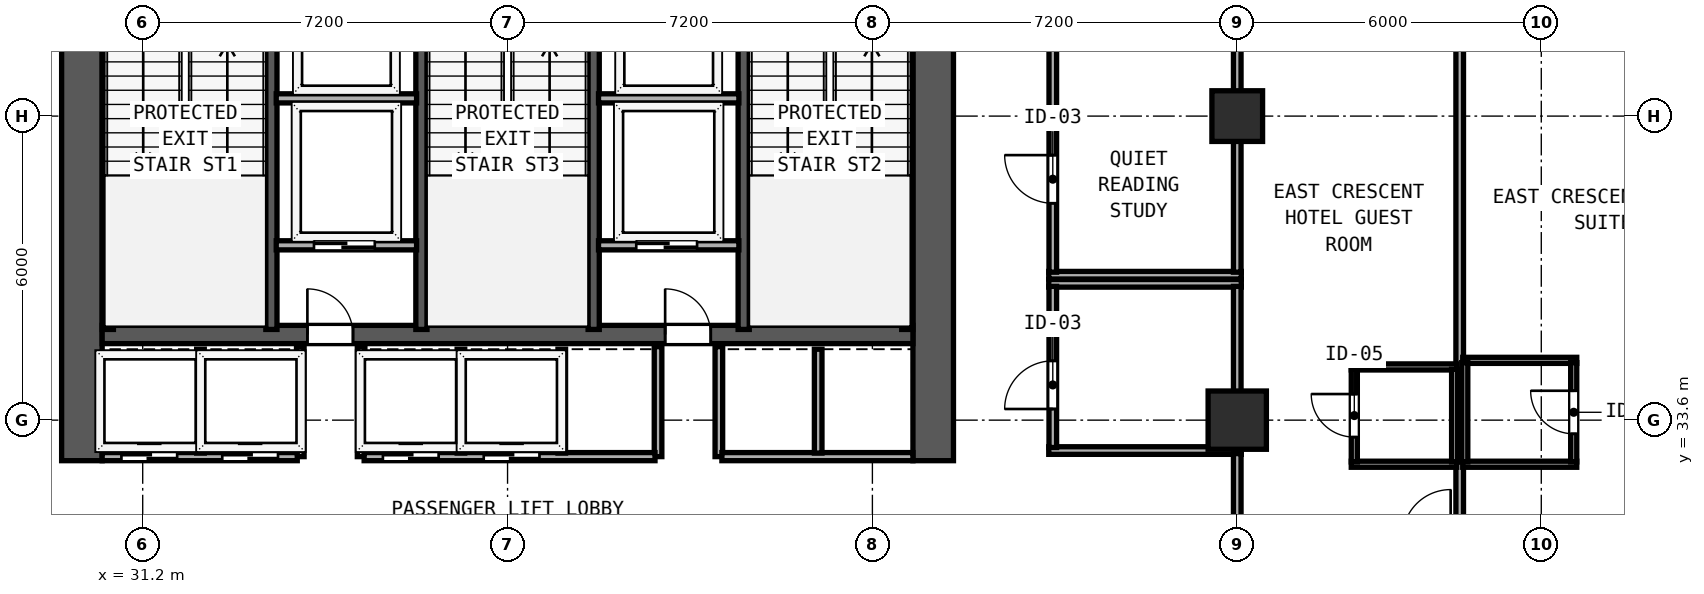
"""IFC4 building model, lengths in metres.
Left out: names, types, materials, properties, quantities, classifications, styles, units other than length and angle.
Written with IfcOpenShell. Run it as: python <this file> out.ifc"""

import sys

from ifc_helpers import new_model, si_unit, direction, frame, frame_2d, origin, origin_2d, place, context, subcontext, project, spatial, rectangle, hollow_rectangle, extrude, element, fill, save


model = new_model("IFC4")
c1 = context("Model", 3, precision=1e-05, world=origin(), true_north=direction((0.0, 1.0)))
c2 = subcontext(c1, "Body", "Model", "MODEL_VIEW")
j1 = project(units=[si_unit("LENGTHUNIT", "METRE"), si_unit("PLANEANGLEUNIT", "RADIAN")], contexts=[c1])
p1 = place(None, origin())
s1 = spatial("IfcSite", under=j1, at=p1, CompositionType="ELEMENT")
p2 = place(p1, origin())
s2 = spatial("IfcBuilding", under=s1, at=p2, CompositionType="ELEMENT")
p3 = place(p2, frame((0.0, 0.0, 55.2)))
s3 = spatial("IfcBuildingStorey", under=s2, at=p3, CompositionType="ELEMENT", Elevation=55.2)
for number, where, z_axis, x_axis in (
    (1, (30.0, 32.8, 0.0), (0.0, 0.0, 1.0), (0.0, 1.0, 0.0)),
    (2, (46.8, 32.8, 0.0), (0.0, 0.0, 1.0), (0.0, 1.0, 0.0)),
):
    element("IfcWall", number, at=place(p3, frame(where, z_axis=z_axis, x_axis=x_axis)), inside=s3, PredefinedType="SHEAR", context=c2, shape_type="SweptSolid", body=[
        extrude(rectangle(XDim=10.0, YDim=0.8, at=frame_2d((5.0, 0.0))), origin(), (0.0, 0.0, 1.0), 3.6),
    ])
p4 = place(p3, frame((30.4, 35.29, 0.0), z_axis=(0.0, 0.0, 1.0), x_axis=(1.0, 0.0, 0.0)))
e3 = element("IfcWall", 3, at=p4, inside=s3, PredefinedType="SHEAR", context=c2, shape_type="SweptSolid", body=[
    extrude(rectangle(XDim=16.0, YDim=0.36, at=frame_2d((8.0, 0.0))), origin(), (0.0, 0.0, 1.0), 3.6),
])
p5 = place(p4, frame((4.95, 0.0, 0.0), z_axis=(0.0, 0.0, 1.0), x_axis=(-1.0, 0.0, 0.0)))
e4 = element("IfcOpeningElement", 4, at=p5, cuts=e3, PredefinedType="OPENING", context=c2, shape_type="SweptSolid", body=[
    extrude(rectangle(XDim=0.9, YDim=2.1, at=frame_2d((0.45, 1.05))), frame((0.0, 0.19, 0.0), z_axis=(0.0, -1.0, 0.0), x_axis=(1.0, 0.0, 0.0)), (0.0, 0.0, 1.0), 0.38),
])
p6 = place(p4, frame((12.01, 0.0, 0.0), z_axis=(0.0, 0.0, 1.0), x_axis=(-1.0, 0.0, 0.0)))
e5 = element("IfcOpeningElement", 5, at=p6, cuts=e3, PredefinedType="OPENING", context=c2, shape_type="SweptSolid", body=[
    extrude(rectangle(XDim=0.9, YDim=2.1, at=frame_2d((0.45, 1.05))), frame((0.0, 0.19, 0.0), z_axis=(0.0, -1.0, 0.0), x_axis=(1.0, 0.0, 0.0)), (0.0, 0.0, 1.0), 0.38),
])
for number, where, z_axis, x_axis in (
    (6, (30.512, 35.39, 0.0), (0.0, 0.0, 1.0), (0.0, 1.0, 0.0)),
    (7, (33.74, 35.39, 0.0), (0.0, 0.0, 1.0), (0.0, 1.0, 0.0)),
    (8, (36.7, 35.39, 0.0), (0.0, 0.0, 1.0), (0.0, 1.0, 0.0)),
    (9, (40.1, 35.39, 0.0), (0.0, 0.0, 1.0), (0.0, 1.0, 0.0)),
    (10, (43.06, 35.39, 0.0), (0.0, 0.0, 1.0), (0.0, 1.0, 0.0)),
    (11, (46.288, 35.39, 0.0), (0.0, 0.0, 1.0), (0.0, 1.0, 0.0)),
):
    element("IfcWall", number, at=place(p3, frame(where, z_axis=z_axis, x_axis=x_axis)), inside=s3, PredefinedType="SHEAR", context=c2, shape_type="SweptSolid", body=[
        extrude(rectangle(XDim=7.41, YDim=0.22, at=frame_2d((3.705, 0.0))), origin(), (0.0, 0.0, 1.0), 3.6),
    ])
p7 = place(p3, frame((52.8, 33.6, 0.0), z_axis=(0.0, 0.0, 1.0), x_axis=(1.0, 0.0, 0.0)))
e12 = element("IfcColumn", 12, at=p7, inside=s3, PredefinedType="COLUMN", context=c2, shape_type="SweptSolid", body=[
    extrude(hollow_rectangle(XDim=1.15, YDim=1.15, WallThickness=0.042, at=origin_2d()), origin(), (0.0, 0.0, 1.0), 3.8),
])
p8 = place(p3, frame((52.8, 39.6, 0.0), z_axis=(0.0, 0.0, 1.0), x_axis=(1.0, 0.0, 0.0)))
e13 = element("IfcColumn", 13, at=p8, inside=s3, PredefinedType="COLUMN", context=c2, shape_type="SweptSolid", body=[
    extrude(hollow_rectangle(XDim=1.0, YDim=1.0, WallThickness=0.038, at=origin_2d()), origin(), (0.0, 0.0, 1.0), 3.8),
])
p9 = place(p3, frame((62.722, 39.509, 0.0), z_axis=(0.0, 0.0, 1.0), x_axis=(-0.759247334792, 0.650802185469, 0.0)))
e14 = element("IfcWall", 14, at=p9, inside=s3, PredefinedType="SOLIDWALL", context=c2, shape_type="SweptSolid", body=[
    extrude(rectangle(XDim=3.719, YDim=0.24, at=frame_2d((1.86, 0.0))), origin(), (0.0, 0.0, 1.0), 3.6),
])
p10 = place(p9, frame((1.6, 0.0, 0.85)))
e15 = element("IfcOpeningElement", 15, at=p10, cuts=e14, PredefinedType="OPENING", context=c2, shape_type="SweptSolid", body=[
    extrude(rectangle(XDim=1.2, YDim=1.85, at=frame_2d((0.6, 0.925))), frame((0.0, 0.13, 0.0), z_axis=(0.0, -1.0, 0.0), x_axis=(1.0, 0.0, 0.0)), (0.0, 0.0, 1.0), 0.26),
])
for number, where, z_axis, x_axis in (
    (16, (33.835, 39.95, 0.0), (0.0, 0.0, 1.0), (1.0, 0.0, 0.0)),
    (17, (40.195, 39.95, 0.0), (0.0, 0.0, 1.0), (1.0, 0.0, 0.0)),
):
    element("IfcWall", number, at=place(p3, frame(where, z_axis=z_axis, x_axis=x_axis)), inside=s3, PredefinedType="SOLIDWALL", context=c2, shape_type="SweptSolid", body=[
        extrude(rectangle(XDim=2.77, YDim=0.18, at=frame_2d((1.385, 0.0))), origin(), (0.0, 0.0, 1.0), 3.6),
    ])
p11 = place(p3, frame((33.835, 37.05, 0.0), z_axis=(0.0, 0.0, 1.0), x_axis=(1.0, 0.0, 0.0)))
e18 = element("IfcWall", 18, at=p11, inside=s3, PredefinedType="SOLIDWALL", context=c2, shape_type="SweptSolid", body=[
    extrude(rectangle(XDim=2.77, YDim=0.18, at=frame_2d((1.385, 0.0))), origin(), (0.0, 0.0, 1.0), 3.6),
])
p12 = place(p11, frame((1.945, 0.0, 0.0), z_axis=(0.0, 0.0, 1.0), x_axis=(-1.0, 0.0, 0.0)))
e19 = element("IfcOpeningElement", 19, at=p12, cuts=e18, PredefinedType="OPENING", context=c2, shape_type="SweptSolid", body=[
    extrude(rectangle(XDim=1.2, YDim=2.2, at=frame_2d((0.6, 1.1))), frame((0.0, 0.1, 0.0), z_axis=(0.0, -1.0, 0.0), x_axis=(1.0, 0.0, 0.0)), (0.0, 0.0, 1.0), 0.2),
])
for number, where, z_axis, x_axis in (
    (20, (34.31, 32.88, 0.0), (0.0, 0.0, 1.0), (0.0, 1.0, 0.0)),
    (21, (35.51, 32.88, 0.0), (0.0, 0.0, 1.0), (0.0, 1.0, 0.0)),
):
    element("IfcWall", number, at=place(p3, frame(where, z_axis=z_axis, x_axis=x_axis)), inside=s3, PredefinedType="SOLIDWALL", context=c2, shape_type="SweptSolid", body=[
        extrude(rectangle(XDim=2.17, YDim=0.15, at=frame_2d((1.085, 0.0))), origin(), (0.0, 0.0, 1.0), 3.6),
    ])
p13 = place(p3, frame((40.195, 37.05, 0.0), z_axis=(0.0, 0.0, 1.0), x_axis=(1.0, 0.0, 0.0)))
e22 = element("IfcWall", 22, at=p13, inside=s3, PredefinedType="SOLIDWALL", context=c2, shape_type="SweptSolid", body=[
    extrude(rectangle(XDim=2.77, YDim=0.18, at=frame_2d((1.385, 0.0))), origin(), (0.0, 0.0, 1.0), 3.6),
])
p14 = place(p13, frame((1.945, 0.0, 0.0), z_axis=(0.0, 0.0, 1.0), x_axis=(-1.0, 0.0, 0.0)))
e23 = element("IfcOpeningElement", 23, at=p14, cuts=e22, PredefinedType="OPENING", context=c2, shape_type="SweptSolid", body=[
    extrude(rectangle(XDim=1.2, YDim=2.2, at=frame_2d((0.6, 1.1))), frame((0.0, 0.1, 0.0), z_axis=(0.0, -1.0, 0.0), x_axis=(1.0, 0.0, 0.0)), (0.0, 0.0, 1.0), 0.2),
])
for number, where, z_axis, x_axis in (
    (24, (41.37, 32.88, 0.0), (0.0, 0.0, 1.0), (0.0, 1.0, 0.0)),
    (25, (42.57, 32.88, 0.0), (0.0, 0.0, 1.0), (0.0, 1.0, 0.0)),
):
    element("IfcWall", number, at=place(p3, frame(where, z_axis=z_axis, x_axis=x_axis)), inside=s3, PredefinedType="SOLIDWALL", context=c2, shape_type="SweptSolid", body=[
        extrude(rectangle(XDim=2.17, YDim=0.15, at=frame_2d((1.085, 0.0))), origin(), (0.0, 0.0, 1.0), 3.6),
    ])
p15 = place(p3, frame((30.4, 32.88, 0.0), z_axis=(0.0, 0.0, 1.0), x_axis=(1.0, 0.0, 0.0)))
e26 = element("IfcWall", 26, at=p15, inside=s3, PredefinedType="SOLIDWALL", context=c2, shape_type="SweptSolid", body=[
    extrude(rectangle(XDim=3.85, YDim=0.16, at=frame_2d((1.925, 0.0))), origin(), (0.0, 0.0, 1.0), 3.6),
])
p16 = place(p15, frame((1.48, 0.0, 0.0), z_axis=(0.0, 0.0, 1.0), x_axis=(-1.0, 0.0, 0.0)))
e27 = element("IfcOpeningElement", 27, at=p16, cuts=e26, PredefinedType="OPENING", context=c2, shape_type="SweptSolid", body=[
    extrude(rectangle(XDim=1.1, YDim=2.2, at=frame_2d((0.55, 1.1))), frame((0.0, 0.09, 0.0), z_axis=(0.0, -1.0, 0.0), x_axis=(1.0, 0.0, 0.0)), (0.0, 0.0, 1.0), 0.18),
])
p17 = place(p15, frame((3.47, 0.0, 0.0), z_axis=(0.0, 0.0, 1.0), x_axis=(-1.0, 0.0, 0.0)))
e28 = element("IfcOpeningElement", 28, at=p17, cuts=e26, PredefinedType="OPENING", context=c2, shape_type="SweptSolid", body=[
    extrude(rectangle(XDim=1.1, YDim=2.2, at=frame_2d((0.55, 1.1))), frame((0.0, 0.09, 0.0), z_axis=(0.0, -1.0, 0.0), x_axis=(1.0, 0.0, 0.0)), (0.0, 0.0, 1.0), 0.18),
])
p18 = place(p3, frame((35.57, 32.88, 0.0), z_axis=(0.0, 0.0, 1.0), x_axis=(1.0, 0.0, 0.0)))
e29 = element("IfcWall", 29, at=p18, inside=s3, PredefinedType="SOLIDWALL", context=c2, shape_type="SweptSolid", body=[
    extrude(rectangle(XDim=5.74, YDim=0.16, at=frame_2d((2.87, 0.0))), origin(), (0.0, 0.0, 1.0), 3.6),
])
p19 = place(p18, frame((1.47, 0.0, 0.0), z_axis=(0.0, 0.0, 1.0), x_axis=(-1.0, 0.0, 0.0)))
e30 = element("IfcOpeningElement", 30, at=p19, cuts=e29, PredefinedType="OPENING", context=c2, shape_type="SweptSolid", body=[
    extrude(rectangle(XDim=1.1, YDim=2.2, at=frame_2d((0.55, 1.1))), frame((0.0, 0.09, 0.0), z_axis=(0.0, -1.0, 0.0), x_axis=(1.0, 0.0, 0.0)), (0.0, 0.0, 1.0), 0.18),
])
p20 = place(p18, frame((3.46, 0.0, 0.0), z_axis=(0.0, 0.0, 1.0), x_axis=(-1.0, 0.0, 0.0)))
e31 = element("IfcOpeningElement", 31, at=p20, cuts=e29, PredefinedType="OPENING", context=c2, shape_type="SweptSolid", body=[
    extrude(rectangle(XDim=1.1, YDim=2.2, at=frame_2d((0.55, 1.1))), frame((0.0, 0.09, 0.0), z_axis=(0.0, -1.0, 0.0), x_axis=(1.0, 0.0, 0.0)), (0.0, 0.0, 1.0), 0.18),
])
p21 = place(p3, frame((42.63, 32.88, 0.0), z_axis=(0.0, 0.0, 1.0), x_axis=(1.0, 0.0, 0.0)))
e32 = element("IfcWall", 32, at=p21, inside=s3, PredefinedType="SOLIDWALL", context=c2, shape_type="SweptSolid", body=[
    extrude(rectangle(XDim=3.77, YDim=0.16, at=frame_2d((1.885, 0.0))), origin(), (0.0, 0.0, 1.0), 3.6),
])
for number, where, z_axis, x_axis in (
    (33, (32.34, 32.95, 0.0), (0.0, 0.0, 1.0), (0.0, 1.0, 0.0)),
    (34, (37.48, 32.95, 0.0), (0.0, 0.0, 1.0), (0.0, 1.0, 0.0)),
    (35, (39.47, 32.95, 0.0), (0.0, 0.0, 1.0), (0.0, 1.0, 0.0)),
    (36, (44.53, 32.95, 0.0), (0.0, 0.0, 1.0), (0.0, 1.0, 0.0)),
):
    element("IfcWall", number, at=place(p3, frame(where, z_axis=z_axis, x_axis=x_axis)), inside=s3, PredefinedType="SOLIDWALL", context=c2, shape_type="SweptSolid", body=[
        extrude(rectangle(XDim=2.05, YDim=0.15, at=frame_2d((1.025, 0.0))), origin(), (0.0, 0.0, 1.0), 3.6),
    ])
for number, where, z_axis, x_axis in (
    (37, (49.08, 36.3, 0.0), (0.0, 0.0, 1.0), (1.0, 0.0, 0.0)),
    (38, (49.08, 33.0, 0.0), (0.0, 0.0, 1.0), (1.0, 0.0, 0.0)),
):
    element("IfcWall", number, at=place(p3, frame(where, z_axis=z_axis, x_axis=x_axis)), inside=s3, PredefinedType="PARTITIONING", context=c2, shape_type="SweptSolid", body=[
        extrude(rectangle(XDim=3.8, YDim=0.15, at=frame_2d((1.9, 0.0))), origin(), (0.0, 0.0, 1.0), 3.6),
    ])
p22 = place(p3, frame((49.16, 33.06, 0.0), z_axis=(0.0, 0.0, 1.0), x_axis=(0.0, 1.0, 0.0)))
e39 = element("IfcWall", 39, at=p22, inside=s3, PredefinedType="PARTITIONING", context=c2, shape_type="SweptSolid", body=[
    extrude(rectangle(XDim=3.18, YDim=0.15, at=frame_2d((1.59, 0.0))), origin(), (0.0, 0.0, 1.0), 3.6),
])
p23 = place(p22, frame((0.76, 0.0, 0.0)))
e40 = element("IfcOpeningElement", 40, at=p23, cuts=e39, PredefinedType="OPENING", context=c2, shape_type="SweptSolid", body=[
    extrude(rectangle(XDim=0.95, YDim=2.12, at=frame_2d((0.475, 1.06))), frame((0.0, 0.085, 0.0), z_axis=(0.0, -1.0, 0.0), x_axis=(1.0, 0.0, 0.0)), (0.0, 0.0, 1.0), 0.17),
])
p24 = place(p3, frame((52.8, 33.06, 0.0), z_axis=(0.0, 0.0, 1.0), x_axis=(0.0, 1.0, 0.0)))
e41 = element("IfcWall", 41, at=p24, inside=s3, PredefinedType="PARTITIONING", context=c2, shape_type="SweptSolid", body=[
    extrude(rectangle(XDim=3.18, YDim=0.15, at=frame_2d((1.59, 0.0))), origin(), (0.0, 0.0, 1.0), 3.097),
])
p25 = place(p3, frame((49.08, 36.46, 0.0), z_axis=(0.0, 0.0, 1.0), x_axis=(1.0, 0.0, 0.0)))
e42 = element("IfcWall", 42, at=p25, inside=s3, PredefinedType="PARTITIONING", context=c2, shape_type="SweptSolid", body=[
    extrude(rectangle(XDim=3.8, YDim=0.15, at=frame_2d((1.9, 0.0))), origin(), (0.0, 0.0, 1.0), 3.6),
])
p26 = place(p3, frame((49.16, 36.52, 0.0), z_axis=(0.0, 0.0, 1.0), x_axis=(0.0, 1.0, 0.0)))
e43 = element("IfcWall", 43, at=p26, inside=s3, PredefinedType="PARTITIONING", context=c2, shape_type="SweptSolid", body=[
    extrude(rectangle(XDim=4.62, YDim=0.15, at=frame_2d((2.31, 0.0))), origin(), (0.0, 0.0, 1.0), 3.6),
])
p27 = place(p26, frame((1.36, 0.0, 0.0)))
e44 = element("IfcOpeningElement", 44, at=p27, cuts=e43, PredefinedType="OPENING", context=c2, shape_type="SweptSolid", body=[
    extrude(rectangle(XDim=0.95, YDim=2.12, at=frame_2d((0.475, 1.06))), frame((0.0, 0.085, 0.0), z_axis=(0.0, -1.0, 0.0), x_axis=(1.0, 0.0, 0.0)), (0.0, 0.0, 1.0), 0.17),
])
p28 = place(p3, frame((52.8, 36.52, 0.0), z_axis=(0.0, 0.0, 1.0), x_axis=(0.0, 1.0, 0.0)))
e45 = element("IfcWall", 45, at=p28, inside=s3, PredefinedType="PARTITIONING", context=c2, shape_type="SweptSolid", body=[
    extrude(rectangle(XDim=4.62, YDim=0.15, at=frame_2d((2.31, 0.0))), origin(), (0.0, 0.0, 1.0), 3.097),
])
p29 = place(p3, frame((52.8, 31.34, 0.0), z_axis=(0.0, 0.0, 1.0), x_axis=(0.0, 1.0, 0.0)))
e46 = element("IfcWall", 46, at=p29, inside=s3, PredefinedType="PARTITIONING", context=c2, shape_type="SweptSolid", body=[
    extrude(rectangle(XDim=1.6, YDim=0.15, at=frame_2d((0.8, 0.0))), origin(), (0.0, 0.0, 1.0), 3.097),
])
p30 = place(p3, frame((57.19, 31.34, 0.0), z_axis=(0.0, 0.0, 1.0), x_axis=(0.0, 1.0, 0.0)))
e47 = element("IfcWall", 47, at=p30, inside=s3, PredefinedType="PARTITIONING", context=c2, shape_type="SweptSolid", body=[
    extrude(rectangle(XDim=11.359, YDim=0.15, at=frame_2d((5.68, 0.0))), origin(), (0.0, 0.0, 1.0), 3.6),
])
for number, where, z_axis, x_axis in (
    (48, (55.05, 34.65, 0.0), (0.0, 0.0, 1.0), (1.0, 0.0, 0.0)),
    (49, (55.05, 32.73, 0.0), (0.0, 0.0, 1.0), (1.0, 0.0, 0.0)),
):
    element("IfcWall", number, at=place(p3, frame(where, z_axis=z_axis, x_axis=x_axis)), inside=s3, PredefinedType="PARTITIONING", context=c2, shape_type="SweptSolid", body=[
        extrude(rectangle(XDim=2.08, YDim=0.12, at=frame_2d((1.04, 0.0))), origin(), (0.0, 0.0, 1.0), 3.6),
    ])
p31 = place(p3, frame((55.11, 32.775, 0.0), z_axis=(0.0, 0.0, 1.0), x_axis=(0.0, 1.0, 0.0)))
e50 = element("IfcWall", 50, at=p31, inside=s3, PredefinedType="PARTITIONING", context=c2, shape_type="SweptSolid", body=[
    extrude(rectangle(XDim=1.83, YDim=0.12, at=frame_2d((0.915, 0.0))), origin(), (0.0, 0.0, 1.0), 3.6),
])
p32 = place(p31, frame((1.34, 0.0, 0.0), z_axis=(0.0, 0.0, 1.0), x_axis=(-1.0, 0.0, 0.0)))
e51 = element("IfcOpeningElement", 51, at=p32, cuts=e50, PredefinedType="OPENING", context=c2, shape_type="SweptSolid", body=[
    extrude(rectangle(XDim=0.85, YDim=2.1, at=frame_2d((0.425, 1.05))), frame((0.0, 0.07, 0.0), z_axis=(0.0, -1.0, 0.0), x_axis=(1.0, 0.0, 0.0)), (0.0, 0.0, 1.0), 0.14),
])
p33 = place(p3, frame((57.09, 32.775, 0.0), z_axis=(0.0, 0.0, 1.0), x_axis=(0.0, 1.0, 0.0)))
e52 = element("IfcWall", 52, at=p33, inside=s3, PredefinedType="PARTITIONING", context=c2, shape_type="SweptSolid", body=[
    extrude(rectangle(XDim=1.83, YDim=0.12, at=frame_2d((0.915, 0.0))), origin(), (0.0, 0.0, 1.0), 3.6),
])
for number, where, z_axis, x_axis in (
    (53, (57.25, 34.78, 0.0), (0.0, 0.0, 1.0), (1.0, 0.0, 0.0)),
    (54, (57.25, 32.73, 0.0), (0.0, 0.0, 1.0), (1.0, 0.0, 0.0)),
):
    element("IfcWall", number, at=place(p3, frame(where, z_axis=z_axis, x_axis=x_axis)), inside=s3, PredefinedType="PARTITIONING", context=c2, shape_type="SweptSolid", body=[
        extrude(rectangle(XDim=2.25, YDim=0.12, at=frame_2d((1.125, 0.0))), origin(), (0.0, 0.0, 1.0), 3.6),
    ])
p34 = place(p3, frame((57.29, 32.775, 0.0), z_axis=(0.0, 0.0, 1.0), x_axis=(0.0, 1.0, 0.0)))
e55 = element("IfcWall", 55, at=p34, inside=s3, PredefinedType="PARTITIONING", context=c2, shape_type="SweptSolid", body=[
    extrude(rectangle(XDim=1.96, YDim=0.12, at=frame_2d((0.98, 0.0))), origin(), (0.0, 0.0, 1.0), 3.6),
])
p35 = place(p3, frame((59.44, 32.775, 0.0), z_axis=(0.0, 0.0, 1.0), x_axis=(0.0, 1.0, 0.0)))
e56 = element("IfcWall", 56, at=p35, inside=s3, PredefinedType="PARTITIONING", context=c2, shape_type="SweptSolid", body=[
    extrude(rectangle(XDim=1.96, YDim=0.12, at=frame_2d((0.98, 0.0))), origin(), (0.0, 0.0, 1.0), 3.6),
])
p36 = place(p35, frame((0.555, 0.0, 0.0)))
e57 = element("IfcOpeningElement", 57, at=p36, cuts=e56, PredefinedType="OPENING", context=c2, shape_type="SweptSolid", body=[
    extrude(rectangle(XDim=0.85, YDim=2.1, at=frame_2d((0.425, 1.05))), frame((0.0, 0.07, 0.0), z_axis=(0.0, -1.0, 0.0), x_axis=(1.0, 0.0, 0.0)), (0.0, 0.0, 1.0), 0.14),
])
p37 = place(p12, origin())
e58 = element("IfcDoor", 58, at=p37, inside=s3, OperationType="SLIDING_TO_RIGHT", PredefinedType="DOOR", context=c2, shape_type="SweptSolid", body=[
    extrude(rectangle(XDim=1.2, YDim=2.2, at=frame_2d((0.6, 1.1))), frame((0.0, 0.025, 0.0), z_axis=(0.0, -1.0, 0.0), x_axis=(1.0, 0.0, 0.0)), (0.0, 0.0, 1.0), 0.05),
])
fill(e19, e58)
p38 = place(p5, origin())
e59 = element("IfcDoor", 59, at=p38, inside=s3, OperationType="SINGLE_SWING_RIGHT", PredefinedType="DOOR", context=c2, shape_type="SweptSolid", body=[
    extrude(rectangle(XDim=0.9, YDim=2.1, at=frame_2d((0.45, 1.05))), frame((0.0, 0.025, 0.0), z_axis=(0.0, -1.0, 0.0), x_axis=(1.0, 0.0, 0.0)), (0.0, 0.0, 1.0), 0.05),
])
fill(e4, e59)
p39 = place(p14, origin())
e60 = element("IfcDoor", 60, at=p39, inside=s3, OperationType="SLIDING_TO_RIGHT", PredefinedType="DOOR", context=c2, shape_type="SweptSolid", body=[
    extrude(rectangle(XDim=1.2, YDim=2.2, at=frame_2d((0.6, 1.1))), frame((0.0, 0.025, 0.0), z_axis=(0.0, -1.0, 0.0), x_axis=(1.0, 0.0, 0.0)), (0.0, 0.0, 1.0), 0.05),
])
fill(e23, e60)
p40 = place(p6, origin())
e61 = element("IfcDoor", 61, at=p40, inside=s3, OperationType="SINGLE_SWING_RIGHT", PredefinedType="DOOR", context=c2, shape_type="SweptSolid", body=[
    extrude(rectangle(XDim=0.9, YDim=2.1, at=frame_2d((0.45, 1.05))), frame((0.0, 0.025, 0.0), z_axis=(0.0, -1.0, 0.0), x_axis=(1.0, 0.0, 0.0)), (0.0, 0.0, 1.0), 0.05),
])
fill(e5, e61)
p41 = place(p16, origin())
e62 = element("IfcDoor", 62, at=p41, inside=s3, OperationType="SLIDING_TO_LEFT", PredefinedType="DOOR", context=c2, shape_type="SweptSolid", body=[
    extrude(rectangle(XDim=1.1, YDim=2.2, at=frame_2d((0.55, 1.1))), frame((0.0, 0.025, 0.0), z_axis=(0.0, -1.0, 0.0), x_axis=(1.0, 0.0, 0.0)), (0.0, 0.0, 1.0), 0.05),
])
fill(e27, e62)
p42 = place(p17, origin())
e63 = element("IfcDoor", 63, at=p42, inside=s3, OperationType="SLIDING_TO_LEFT", PredefinedType="DOOR", context=c2, shape_type="SweptSolid", body=[
    extrude(rectangle(XDim=1.1, YDim=2.2, at=frame_2d((0.55, 1.1))), frame((0.0, 0.025, 0.0), z_axis=(0.0, -1.0, 0.0), x_axis=(1.0, 0.0, 0.0)), (0.0, 0.0, 1.0), 0.05),
])
fill(e28, e63)
p43 = place(p19, origin())
e64 = element("IfcDoor", 64, at=p43, inside=s3, OperationType="SLIDING_TO_LEFT", PredefinedType="DOOR", context=c2, shape_type="SweptSolid", body=[
    extrude(rectangle(XDim=1.1, YDim=2.2, at=frame_2d((0.55, 1.1))), frame((0.0, 0.025, 0.0), z_axis=(0.0, -1.0, 0.0), x_axis=(1.0, 0.0, 0.0)), (0.0, 0.0, 1.0), 0.05),
])
fill(e30, e64)
p44 = place(p20, origin())
e65 = element("IfcDoor", 65, at=p44, inside=s3, OperationType="SLIDING_TO_LEFT", PredefinedType="DOOR", context=c2, shape_type="SweptSolid", body=[
    extrude(rectangle(XDim=1.1, YDim=2.2, at=frame_2d((0.55, 1.1))), frame((0.0, 0.025, 0.0), z_axis=(0.0, -1.0, 0.0), x_axis=(1.0, 0.0, 0.0)), (0.0, 0.0, 1.0), 0.05),
])
fill(e31, e65)
p45 = place(p23, origin())
e66 = element("IfcDoor", 66, at=p45, inside=s3, OperationType="SINGLE_SWING_LEFT", PredefinedType="DOOR", context=c2, shape_type="SweptSolid", body=[
    extrude(rectangle(XDim=0.95, YDim=2.12, at=frame_2d((0.475, 1.06))), frame((0.0, 0.025, 0.0), z_axis=(0.0, -1.0, 0.0), x_axis=(1.0, 0.0, 0.0)), (0.0, 0.0, 1.0), 0.05),
])
fill(e40, e66)
p46 = place(p27, origin())
e67 = element("IfcDoor", 67, at=p46, inside=s3, OperationType="SINGLE_SWING_RIGHT", PredefinedType="DOOR", context=c2, shape_type="SweptSolid", body=[
    extrude(rectangle(XDim=0.95, YDim=2.12, at=frame_2d((0.475, 1.06))), frame((0.0, 0.025, 0.0), z_axis=(0.0, -1.0, 0.0), x_axis=(1.0, 0.0, 0.0)), (0.0, 0.0, 1.0), 0.05),
])
fill(e44, e67)
p47 = place(p32, origin())
e68 = element("IfcDoor", 68, at=p47, inside=s3, OperationType="SINGLE_SWING_LEFT", PredefinedType="DOOR", context=c2, shape_type="SweptSolid", body=[
    extrude(rectangle(XDim=0.85, YDim=2.1, at=frame_2d((0.425, 1.05))), frame((0.0, 0.025, 0.0), z_axis=(0.0, -1.0, 0.0), x_axis=(1.0, 0.0, 0.0)), (0.0, 0.0, 1.0), 0.05),
])
fill(e51, e68)
p48 = place(p36, origin())
e69 = element("IfcDoor", 69, at=p48, inside=s3, OperationType="SINGLE_SWING_RIGHT", PredefinedType="DOOR", context=c2, shape_type="SweptSolid", body=[
    extrude(rectangle(XDim=0.85, YDim=2.1, at=frame_2d((0.425, 1.05))), frame((0.0, 0.025, 0.0), z_axis=(0.0, -1.0, 0.0), x_axis=(1.0, 0.0, 0.0)), (0.0, 0.0, 1.0), 0.05),
])
fill(e57, e69)
save(model, sys.argv[1])
